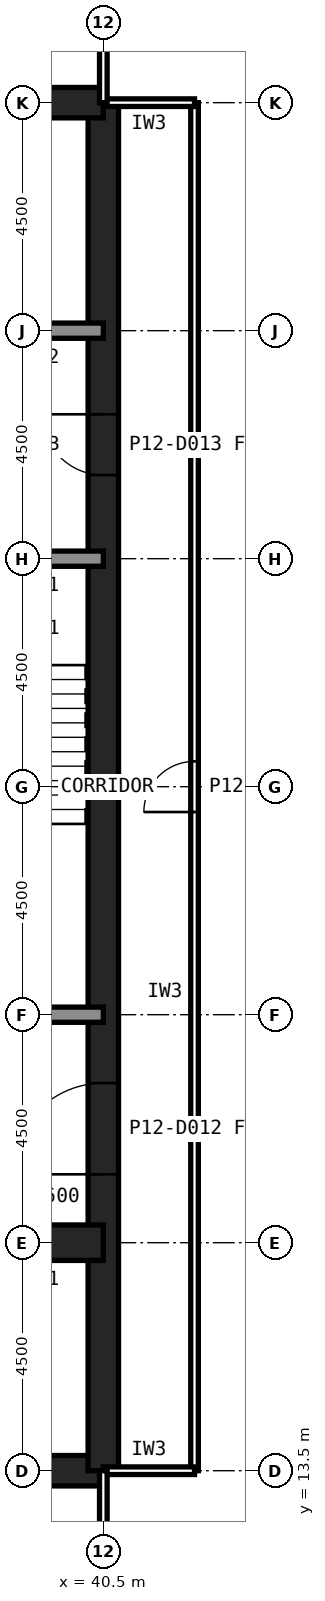
"""IFC4 building model, lengths in metres.
Left out: names, types, materials, properties, quantities, classifications, styles, units other than length and angle.
Written with IfcOpenShell. Run it as: python <this file> out.ifc"""

import sys

from ifc_helpers import new_model, si_unit, direction, frame, frame_2d, origin, place, context, subcontext, project, spatial, rectangle, extrude, element, fill, save


model = new_model("IFC4")
c1 = context("Model", 3, precision=1e-05, world=origin(), true_north=direction((0.0, 1.0)))
c2 = subcontext(c1, "Body", "Model", "MODEL_VIEW")
j1 = project(units=[si_unit("LENGTHUNIT", "METRE"), si_unit("PLANEANGLEUNIT", "RADIAN")], contexts=[c1])
p1 = place(None, origin())
s1 = spatial("IfcSite", under=j1, at=p1, CompositionType="ELEMENT")
p2 = place(p1, origin())
s2 = spatial("IfcBuilding", under=s1, at=p2, CompositionType="ELEMENT")
p3 = place(p2, frame((0.0, 0.0, 54.2)))
s3 = spatial("IfcBuildingStorey", under=s2, at=p3, CompositionType="ELEMENT", Elevation=54.2)
p4 = place(p3, frame((13.5, 13.5, 0.0), z_axis=(0.0, 0.0, 1.0), x_axis=(1.0, 0.0, 0.0)))
e1 = element("IfcWall", 1, at=p4, inside=s3, PredefinedType="SHEAR", context=c2, shape_type="SweptSolid", body=[
    extrude(rectangle(XDim=27.0, YDim=0.6, at=frame_2d((13.5, 0.0))), origin(), (0.0, 0.0, 1.0), 4.2),
])
p5 = place(p3, frame((40.5, 13.5, 0.0), z_axis=(0.0, 0.0, 1.0), x_axis=(0.0, 1.0, 0.0)))
e2 = element("IfcWall", 2, at=p5, inside=s3, PredefinedType="SHEAR", context=c2, shape_type="SweptSolid", body=[
    extrude(rectangle(XDim=27.0, YDim=0.6, at=frame_2d((13.5, 0.0))), origin(), (0.0, 0.0, 1.0), 4.2),
])
p6 = place(p5, frame((5.85, 0.0, 0.0)))
e3 = element("IfcOpeningElement", 3, at=p6, cuts=e2, PredefinedType="OPENING", context=c2, shape_type="SweptSolid", body=[
    extrude(rectangle(XDim=1.8, YDim=2.1, at=frame_2d((0.9, 1.05))), frame((0.0, 0.31, 0.0), z_axis=(0.0, -1.0, 0.0), x_axis=(1.0, 0.0, 0.0)), (0.0, 0.0, 1.0), 0.62),
])
p7 = place(p5, frame((19.65, 0.0, 0.0)))
e4 = element("IfcOpeningElement", 4, at=p7, cuts=e2, PredefinedType="OPENING", context=c2, shape_type="SweptSolid", body=[
    extrude(rectangle(XDim=1.2, YDim=2.1, at=frame_2d((0.6, 1.05))), frame((0.0, 0.31, 0.0), z_axis=(0.0, -1.0, 0.0), x_axis=(1.0, 0.0, 0.0)), (0.0, 0.0, 1.0), 0.62),
])
p8 = place(p3, frame((40.5, 40.5, 0.0), z_axis=(0.0, 0.0, 1.0), x_axis=(-1.0, 0.0, 0.0)))
e5 = element("IfcWall", 5, at=p8, inside=s3, PredefinedType="SHEAR", context=c2, shape_type="SweptSolid", body=[
    extrude(rectangle(XDim=27.0, YDim=0.6, at=frame_2d((13.5, 0.0))), origin(), (0.0, 0.0, 1.0), 4.2),
])
p9 = place(p3, frame((13.5, 18.0, 0.0), z_axis=(0.0, 0.0, 1.0), x_axis=(1.0, 0.0, 0.0)))
e6 = element("IfcWall", 6, at=p9, inside=s3, PredefinedType="SHEAR", context=c2, shape_type="SweptSolid", body=[
    extrude(rectangle(XDim=27.0, YDim=0.7, at=frame_2d((13.5, 0.0))), origin(), (0.0, 0.0, 1.0), 4.2),
])
p10 = place(p9, frame((24.3, 0.0, 0.0)))
e7 = element("IfcOpeningElement", 7, at=p10, cuts=e6, PredefinedType="OPENING", context=c2, shape_type="SweptSolid", body=[
    extrude(rectangle(XDim=0.9, YDim=2.1, at=frame_2d((0.45, 1.05))), frame((0.0, 0.36, 0.0), z_axis=(0.0, -1.0, 0.0), x_axis=(1.0, 0.0, 0.0)), (0.0, 0.0, 1.0), 0.72),
])
p11 = place(p9, frame((5.45, 0.0, 0.0)))
e8 = element("IfcOpeningElement", 8, at=p11, cuts=e6, PredefinedType="OPENING", context=c2, shape_type="SweptSolid", body=[
    extrude(rectangle(XDim=1.1, YDim=2.1, at=frame_2d((0.55, 1.05))), frame((0.0, 0.36, 0.0), z_axis=(0.0, -1.0, 0.0), x_axis=(1.0, 0.0, 0.0)), (0.0, 0.0, 1.0), 0.72),
])
p12 = place(p9, frame((8.45, 0.0, 0.0)))
e9 = element("IfcOpeningElement", 9, at=p12, cuts=e6, PredefinedType="OPENING", context=c2, shape_type="SweptSolid", body=[
    extrude(rectangle(XDim=1.1, YDim=2.1, at=frame_2d((0.55, 1.05))), frame((0.0, 0.36, 0.0), z_axis=(0.0, -1.0, 0.0), x_axis=(1.0, 0.0, 0.0)), (0.0, 0.0, 1.0), 0.72),
])
p13 = place(p9, frame((11.45, 0.0, 0.0)))
e10 = element("IfcOpeningElement", 10, at=p13, cuts=e6, PredefinedType="OPENING", context=c2, shape_type="SweptSolid", body=[
    extrude(rectangle(XDim=1.1, YDim=2.1, at=frame_2d((0.55, 1.05))), frame((0.0, 0.36, 0.0), z_axis=(0.0, -1.0, 0.0), x_axis=(1.0, 0.0, 0.0)), (0.0, 0.0, 1.0), 0.72),
])
p14 = place(p9, frame((14.45, 0.0, 0.0)))
e11 = element("IfcOpeningElement", 11, at=p14, cuts=e6, PredefinedType="OPENING", context=c2, shape_type="SweptSolid", body=[
    extrude(rectangle(XDim=1.1, YDim=2.1, at=frame_2d((0.55, 1.05))), frame((0.0, 0.36, 0.0), z_axis=(0.0, -1.0, 0.0), x_axis=(1.0, 0.0, 0.0)), (0.0, 0.0, 1.0), 0.72),
])
p15 = place(p9, frame((17.45, 0.0, 0.0)))
e12 = element("IfcOpeningElement", 12, at=p15, cuts=e6, PredefinedType="OPENING", context=c2, shape_type="SweptSolid", body=[
    extrude(rectangle(XDim=1.1, YDim=2.1, at=frame_2d((0.55, 1.05))), frame((0.0, 0.36, 0.0), z_axis=(0.0, -1.0, 0.0), x_axis=(1.0, 0.0, 0.0)), (0.0, 0.0, 1.0), 0.72),
])
p16 = place(p9, frame((20.45, 0.0, 0.0)))
e13 = element("IfcOpeningElement", 13, at=p16, cuts=e6, PredefinedType="OPENING", context=c2, shape_type="SweptSolid", body=[
    extrude(rectangle(XDim=1.1, YDim=2.1, at=frame_2d((0.55, 1.05))), frame((0.0, 0.36, 0.0), z_axis=(0.0, -1.0, 0.0), x_axis=(1.0, 0.0, 0.0)), (0.0, 0.0, 1.0), 0.72),
])
p17 = place(p9, frame((1.6, 0.0, 0.0)))
e14 = element("IfcOpeningElement", 14, at=p17, cuts=e6, PredefinedType="OPENING", context=c2, shape_type="SweptSolid", body=[
    extrude(rectangle(XDim=1.3, YDim=2.2, at=frame_2d((0.65, 1.1))), frame((0.0, 0.36, 0.0), z_axis=(0.0, -1.0, 0.0), x_axis=(1.0, 0.0, 0.0)), (0.0, 0.0, 1.0), 0.72),
])
p18 = place(p3, frame((13.5, 36.0, 0.0), z_axis=(0.0, 0.0, 1.0), x_axis=(1.0, 0.0, 0.0)))
e15 = element("IfcWall", 15, at=p18, inside=s3, PredefinedType="SOLIDWALL", context=c2, shape_type="SweptSolid", body=[
    extrude(rectangle(XDim=27.0, YDim=0.3, at=frame_2d((13.5, 0.0))), origin(), (0.0, 0.0, 1.0), 4.04),
])
p19 = place(p18, frame((1.8, 0.0, 0.0)))
e16 = element("IfcOpeningElement", 16, at=p19, cuts=e15, PredefinedType="OPENING", context=c2, shape_type="SweptSolid", body=[
    extrude(rectangle(XDim=0.9, YDim=2.1, at=frame_2d((0.45, 1.05))), frame((0.0, 0.16, 0.0), z_axis=(0.0, -1.0, 0.0), x_axis=(1.0, 0.0, 0.0)), (0.0, 0.0, 1.0), 0.32),
])
p20 = place(p18, frame((24.1, 0.0, 0.0)))
e17 = element("IfcOpeningElement", 17, at=p20, cuts=e15, PredefinedType="OPENING", context=c2, shape_type="SweptSolid", body=[
    extrude(rectangle(XDim=1.3, YDim=2.2, at=frame_2d((0.65, 1.1))), frame((0.0, 0.16, 0.0), z_axis=(0.0, -1.0, 0.0), x_axis=(1.0, 0.0, 0.0)), (0.0, 0.0, 1.0), 0.32),
])
p21 = place(p3, frame((13.5, 22.5, 0.0), z_axis=(0.0, 0.0, 1.0), x_axis=(1.0, 0.0, 0.0)))
e18 = element("IfcWall", 18, at=p21, inside=s3, PredefinedType="SOLIDWALL", context=c2, shape_type="SweptSolid", body=[
    extrude(rectangle(XDim=27.0, YDim=0.3, at=frame_2d((13.5, 0.0))), origin(), (0.0, 0.0, 1.0), 4.04),
])
p22 = place(p21, frame((1.65, 0.0, 0.0)))
e19 = element("IfcOpeningElement", 19, at=p22, cuts=e18, PredefinedType="OPENING", context=c2, shape_type="SweptSolid", body=[
    extrude(rectangle(XDim=1.2, YDim=2.1, at=frame_2d((0.6, 1.05))), frame((0.0, 0.16, 0.0), z_axis=(0.0, -1.0, 0.0), x_axis=(1.0, 0.0, 0.0)), (0.0, 0.0, 1.0), 0.32),
])
p23 = place(p21, frame((6.025, 0.0, 0.0)))
e20 = element("IfcOpeningElement", 20, at=p23, cuts=e18, PredefinedType="OPENING", context=c2, shape_type="SweptSolid", body=[
    extrude(rectangle(XDim=1.0, YDim=2.1, at=frame_2d((0.5, 1.05))), frame((0.0, 0.16, 0.0), z_axis=(0.0, -1.0, 0.0), x_axis=(1.0, 0.0, 0.0)), (0.0, 0.0, 1.0), 0.32),
])
p24 = place(p21, frame((10.525, 0.0, 0.0)))
e21 = element("IfcOpeningElement", 21, at=p24, cuts=e18, PredefinedType="OPENING", context=c2, shape_type="SweptSolid", body=[
    extrude(rectangle(XDim=1.0, YDim=2.1, at=frame_2d((0.5, 1.05))), frame((0.0, 0.16, 0.0), z_axis=(0.0, -1.0, 0.0), x_axis=(1.0, 0.0, 0.0)), (0.0, 0.0, 1.0), 0.32),
])
p25 = place(p21, frame((19.75, 0.0, 0.0)))
e22 = element("IfcOpeningElement", 22, at=p25, cuts=e18, PredefinedType="OPENING", context=c2, shape_type="SweptSolid", body=[
    extrude(rectangle(XDim=1.0, YDim=2.1, at=frame_2d((0.5, 1.05))), frame((0.0, 0.16, 0.0), z_axis=(0.0, -1.0, 0.0), x_axis=(1.0, 0.0, 0.0)), (0.0, 0.0, 1.0), 0.32),
])
p26 = place(p21, frame((15.05, 0.0, 0.0)))
e23 = element("IfcOpeningElement", 23, at=p26, cuts=e18, PredefinedType="OPENING", context=c2, shape_type="SweptSolid", body=[
    extrude(rectangle(XDim=1.4, YDim=2.4, at=frame_2d((0.7, 1.2))), frame((0.0, 0.16, 0.0), z_axis=(0.0, -1.0, 0.0), x_axis=(1.0, 0.0, 0.0)), (0.0, 0.0, 1.0), 0.32),
])
p27 = place(p3, frame((13.5, 31.5, 0.0), z_axis=(0.0, 0.0, 1.0), x_axis=(1.0, 0.0, 0.0)))
e24 = element("IfcWall", 24, at=p27, inside=s3, PredefinedType="SOLIDWALL", context=c2, shape_type="SweptSolid", body=[
    extrude(rectangle(XDim=27.0, YDim=0.3, at=frame_2d((13.5, 0.0))), origin(), (0.0, 0.0, 1.0), 4.04),
])
p28 = place(p27, frame((24.15, 0.0, 0.0)))
e25 = element("IfcOpeningElement", 25, at=p28, cuts=e24, PredefinedType="OPENING", context=c2, shape_type="SweptSolid", body=[
    extrude(rectangle(XDim=1.2, YDim=2.1, at=frame_2d((0.6, 1.05))), frame((0.0, 0.16, 0.0), z_axis=(0.0, -1.0, 0.0), x_axis=(1.0, 0.0, 0.0)), (0.0, 0.0, 1.0), 0.32),
])
p29 = place(p27, frame((15.3, 0.0, 0.0)))
e26 = element("IfcOpeningElement", 26, at=p29, cuts=e24, PredefinedType="OPENING", context=c2, shape_type="SweptSolid", body=[
    extrude(rectangle(XDim=0.9, YDim=2.1, at=frame_2d((0.45, 1.05))), frame((0.0, 0.16, 0.0), z_axis=(0.0, -1.0, 0.0), x_axis=(1.0, 0.0, 0.0)), (0.0, 0.0, 1.0), 0.32),
])
p30 = place(p27, frame((19.8, 0.0, 0.0)))
e27 = element("IfcOpeningElement", 27, at=p30, cuts=e24, PredefinedType="OPENING", context=c2, shape_type="SweptSolid", body=[
    extrude(rectangle(XDim=0.9, YDim=2.1, at=frame_2d((0.45, 1.05))), frame((0.0, 0.16, 0.0), z_axis=(0.0, -1.0, 0.0), x_axis=(1.0, 0.0, 0.0)), (0.0, 0.0, 1.0), 0.32),
])
p31 = place(p3, frame((42.3, 13.5, 0.0), z_axis=(0.0, 0.0, 1.0), x_axis=(0.0, 1.0, 0.0)))
e28 = element("IfcWall", 28, at=p31, inside=s3, PredefinedType="PARTITIONING", context=c2, shape_type="SweptSolid", body=[
    extrude(rectangle(XDim=27.0, YDim=0.15, at=frame_2d((13.5, 0.0))), origin(), (0.0, 0.0, 1.0), 4.04),
])
p32 = place(p31, frame((13.0, 0.0, 0.0)))
e29 = element("IfcOpeningElement", 29, at=p32, cuts=e28, PredefinedType="OPENING", context=c2, shape_type="SweptSolid", body=[
    extrude(rectangle(XDim=1.0, YDim=2.1, at=frame_2d((0.5, 1.05))), frame((0.0, 0.085, 0.0), z_axis=(0.0, -1.0, 0.0), x_axis=(1.0, 0.0, 0.0)), (0.0, 0.0, 1.0), 0.17),
])
for number, where, z_axis, x_axis in (
    (30, (40.5, 13.5, 0.0), (0.0, 0.0, 1.0), (1.0, 0.0, 0.0)),
    (31, (42.3, 40.5, 0.0), (0.0, 0.0, 1.0), (-1.0, 0.0, 0.0)),
):
    element("IfcWall", number, at=place(p3, frame(where, z_axis=z_axis, x_axis=x_axis)), inside=s3, PredefinedType="PARTITIONING", context=c2, shape_type="SweptSolid", body=[
        extrude(rectangle(XDim=1.8, YDim=0.15, at=frame_2d((0.9, 0.0))), origin(), (0.0, 0.0, 1.0), 3.189),
    ])
p33 = place(p3, frame((40.5, 8.1, 0.0), z_axis=(0.0, 0.0, 1.0), x_axis=(0.0, 1.0, 0.0)))
e32 = element("IfcWall", 32, at=p33, inside=s3, PredefinedType="PARTITIONING", context=c2, shape_type="SweptSolid", body=[
    extrude(rectangle(XDim=5.4, YDim=0.15, at=frame_2d((2.7, 0.0))), origin(), (0.0, 0.0, 1.0), 3.189),
])
p34 = place(p33, frame((2.2, 0.0, 0.0)))
e33 = element("IfcOpeningElement", 33, at=p34, cuts=e32, PredefinedType="OPENING", context=c2, shape_type="SweptSolid", body=[
    extrude(rectangle(XDim=1.0, YDim=2.1, at=frame_2d((0.5, 1.05))), frame((0.0, 0.085, 0.0), z_axis=(0.0, -1.0, 0.0), x_axis=(1.0, 0.0, 0.0)), (0.0, 0.0, 1.0), 0.17),
])
p35 = place(p3, frame((40.5, 40.5, 0.0), z_axis=(0.0, 0.0, 1.0), x_axis=(0.0, 1.0, 0.0)))
e34 = element("IfcWall", 34, at=p35, inside=s3, PredefinedType="PARTITIONING", context=c2, shape_type="SweptSolid", body=[
    extrude(rectangle(XDim=4.5, YDim=0.15, at=frame_2d((2.25, 0.0))), origin(), (0.0, 0.0, 1.0), 3.189),
])
p36 = place(p6, origin())
e35 = element("IfcDoor", 35, at=p36, inside=s3, OperationType="SINGLE_SWING_LEFT", PredefinedType="DOOR", context=c2, shape_type="SweptSolid", body=[
    extrude(rectangle(XDim=1.8, YDim=2.1, at=frame_2d((0.9, 1.05))), frame((0.0, 0.025, 0.0), z_axis=(0.0, -1.0, 0.0), x_axis=(1.0, 0.0, 0.0)), (0.0, 0.0, 1.0), 0.05),
])
fill(e3, e35)
p37 = place(p7, origin())
e36 = element("IfcDoor", 36, at=p37, inside=s3, OperationType="SINGLE_SWING_RIGHT", PredefinedType="DOOR", context=c2, shape_type="SweptSolid", body=[
    extrude(rectangle(XDim=1.2, YDim=2.1, at=frame_2d((0.6, 1.05))), frame((0.0, 0.025, 0.0), z_axis=(0.0, -1.0, 0.0), x_axis=(1.0, 0.0, 0.0)), (0.0, 0.0, 1.0), 0.05),
])
fill(e4, e36)
p38 = place(p32, origin())
e37 = element("IfcDoor", 37, at=p38, inside=s3, OperationType="SINGLE_SWING_LEFT", PredefinedType="DOOR", context=c2, shape_type="SweptSolid", body=[
    extrude(rectangle(XDim=1.0, YDim=2.1, at=frame_2d((0.5, 1.05))), frame((0.0, 0.025, 0.0), z_axis=(0.0, -1.0, 0.0), x_axis=(1.0, 0.0, 0.0)), (0.0, 0.0, 1.0), 0.05),
])
fill(e29, e37)
save(model, sys.argv[1])
